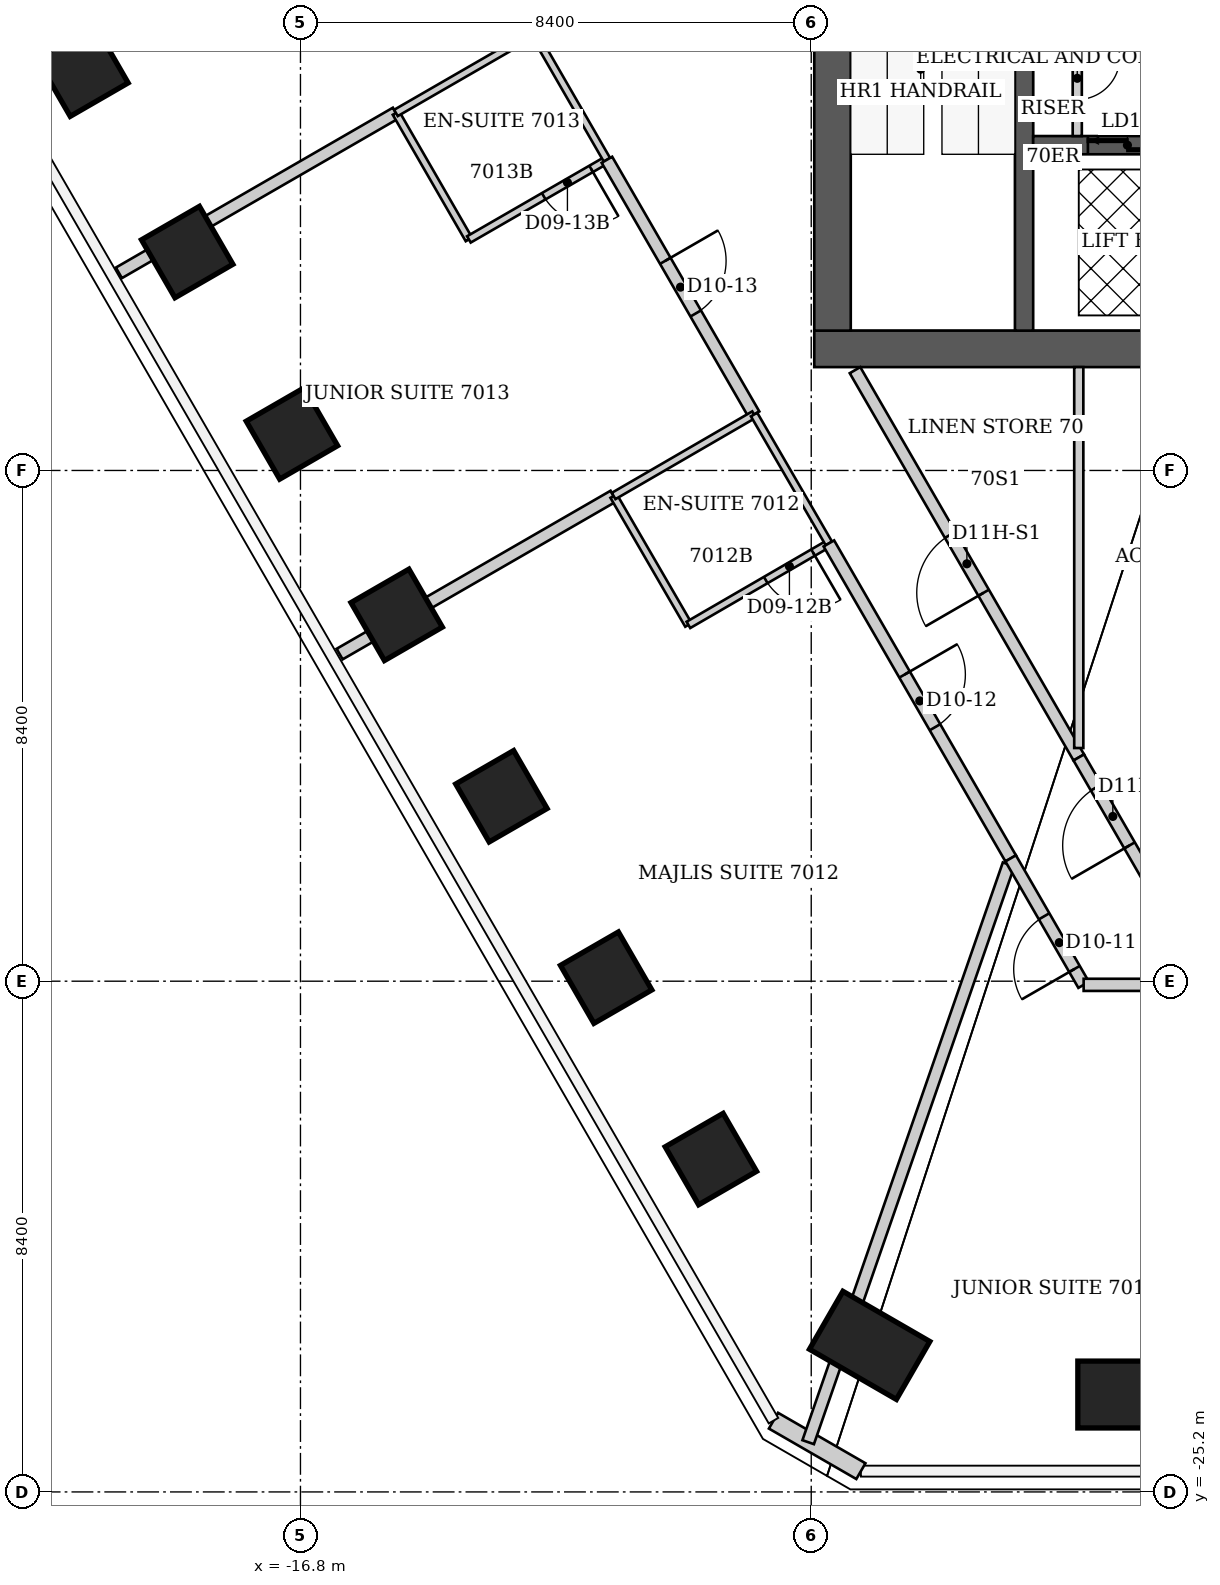
"""IFC4 building model, lengths in metres.
Left out: names, types, materials, properties, quantities, classifications, styles, units other than length and angle.
Written with IfcOpenShell. Run it as: python <this file> out.ifc"""

import sys

from ifc_helpers import new_model, si_unit, direction, frame, frame_2d, origin, origin_2d, place, context, subcontext, project, spatial, rectangle, extrude, element, fill, save


model = new_model("IFC4")
c1 = context("Model", 3, precision=1e-05, world=origin(), true_north=direction((0.0, 1.0)))
c2 = subcontext(c1, "Body", "Model", "MODEL_VIEW")
j1 = project(units=[si_unit("LENGTHUNIT", "METRE"), si_unit("PLANEANGLEUNIT", "RADIAN")], contexts=[c1])
p1 = place(None, origin())
s1 = spatial("IfcSite", under=j1, at=p1, CompositionType="ELEMENT")
p2 = place(p1, origin())
s2 = spatial("IfcBuilding", under=s1, at=p2, CompositionType="ELEMENT")
p3 = place(p2, frame((0.0, 0.0, 279.8)))
s3 = spatial("IfcBuildingStorey", under=s2, at=p3, CompositionType="ELEMENT", Elevation=279.8)
p4 = place(p3, frame((-3.466, -23.598, 0.0), z_axis=(0.0, 0.0, 1.0), x_axis=(0.0, -1.0, 0.0)))
e1 = element("IfcColumn", 1, at=p4, inside=s3, PredefinedType="COLUMN", context=c2, shape_type="SweptSolid", body=[
    extrude(rectangle(XDim=1.1, YDim=1.1, at=origin_2d()), origin(), (0.0, 0.0, 1.0), 3.8),
])
p5 = place(p3, frame((-7.439, -22.79, 0.0), z_axis=(0.0, 0.0, 1.0), x_axis=(-0.5, -0.866025403784, 0.0)))
e2 = element("IfcColumn", 2, at=p5, inside=s3, PredefinedType="COLUMN", context=c2, shape_type="SweptSolid", body=[
    extrude(rectangle(XDim=1.1, YDim=1.65, at=origin_2d()), origin(), (0.0, 0.0, 1.0), 3.8),
])
for number, where, z_axis, x_axis in (
    (3, (-10.05, -19.725, 0.0), (0.0, 0.0, 1.0), (-0.866, -0.5, 0.0)),
    (4, (-11.773, -16.742, 0.0), (0.0, 0.0, 1.0), (-0.866, -0.5, 0.0)),
    (5, (-13.495, -13.759, 0.0), (0.0, 0.0, 1.0), (-0.866, -0.5, 0.0)),
    (6, (-15.218, -10.775, 0.0), (0.0, 0.0, 1.0), (-0.866, -0.5, 0.0)),
    (7, (-16.94, -7.792, 0.0), (0.0, 0.0, 1.0), (-0.866, -0.5, 0.0)),
    (8, (-18.663, -4.808, 0.0), (0.0, 0.0, 1.0), (-0.866, -0.5, 0.0)),
    (9, (-20.385, -1.824, 0.0), (0.0, 0.0, 1.0), (-0.866, -0.5, 0.0)),
):
    element("IfcColumn", number, at=place(p3, frame(where, z_axis=z_axis, x_axis=x_axis)), inside=s3, PredefinedType="COLUMN", context=c2, shape_type="SweptSolid", body=[
        extrude(rectangle(XDim=1.1, YDim=1.1, at=origin_2d()), origin(), (0.0, 0.0, 1.0), 3.8),
    ])
p6 = place(p3, frame((-8.35, -6.4, 0.0), z_axis=(0.0, 0.0, 1.0), x_axis=(1.0, 0.0, 0.0)))
e10 = element("IfcWall", 10, at=p6, inside=s3, PredefinedType="SHEAR", context=c2, shape_type="SweptSolid", body=[
    extrude(rectangle(XDim=16.7, YDim=0.6, at=frame_2d((8.35, 0.0))), origin(), (0.0, 0.0, 1.0), 3.8),
])
p7 = place(p3, frame((-8.05, -6.1, 0.0), z_axis=(0.0, 0.0, 1.0), x_axis=(0.0, 1.0, 0.0)))
e11 = element("IfcWall", 11, at=p7, inside=s3, PredefinedType="SHEAR", context=c2, shape_type="SweptSolid", body=[
    extrude(rectangle(XDim=12.2, YDim=0.6, at=frame_2d((6.1, 0.0))), origin(), (0.0, 0.0, 1.0), 3.8),
])
p8 = place(p7, frame((7.6, 0.0, 0.0)))
e12 = element("IfcOpeningElement", 12, at=p8, cuts=e11, PredefinedType="OPENING", context=c2, shape_type="SweptSolid", body=[
    extrude(rectangle(XDim=1.2, YDim=2.2, at=frame_2d((0.6, 1.1))), frame((0.0, 0.3, 0.0), z_axis=(0.0, -1.0, 0.0), x_axis=(1.0, 0.0, 0.0)), (0.0, 0.0, 1.0), 0.6),
])
p9 = place(p3, frame((-4.9, -6.1, 0.0), z_axis=(0.0, 0.0, 1.0), x_axis=(0.0, 1.0, 0.0)))
e13 = element("IfcWall", 13, at=p9, inside=s3, PredefinedType="SHEAR", context=c2, shape_type="SweptSolid", body=[
    extrude(rectangle(XDim=7.2, YDim=0.3, at=frame_2d((3.6, 0.0))), origin(), (0.0, 0.0, 1.0), 3.8),
])
p10 = place(p3, frame((-4.75, -3.05, 0.0), z_axis=(0.0, 0.0, 1.0), x_axis=(1.0, 0.0, 0.0)))
e14 = element("IfcWall", 14, at=p10, inside=s3, PredefinedType="SHEAR", context=c2, shape_type="SweptSolid", body=[
    extrude(rectangle(XDim=3.1, YDim=0.3, at=frame_2d((1.55, 0.0))), origin(), (0.0, 0.0, 1.0), 3.8),
])
p11 = place(p10, frame((0.9, 0.0, 0.0)))
e15 = element("IfcOpeningElement", 15, at=p11, cuts=e14, PredefinedType="OPENING", context=c2, shape_type="SweptSolid", body=[
    extrude(rectangle(XDim=1.3, YDim=2.1, at=frame_2d((0.65, 1.05))), frame((0.0, 0.15, 0.0), z_axis=(0.0, -1.0, 0.0), x_axis=(1.0, 0.0, 0.0)), (0.0, 0.0, 1.0), 0.3),
])
p12 = place(p3, frame((-7.583, -24.858, 0.0), z_axis=(0.0, 0.0, 1.0), x_axis=(-0.865989634427, 0.500061949227, 0.0)))
e16 = element("IfcWall", 16, at=p12, inside=s3, PredefinedType="SOLIDWALL", context=c2, shape_type="SweptSolid", body=[
    extrude(rectangle(XDim=1.66, YDim=0.3, at=frame_2d((0.83, 0.0))), origin(), (0.0, 0.0, 1.0), 3.64),
])
p13 = place(p3, frame((-19.786, -5.15, 0.0), z_axis=(0.0, 0.0, 1.0), x_axis=(0.866075853571, 0.499912608224, 0.0)))
e17 = element("IfcWall", 17, at=p13, inside=s3, PredefinedType="PARTITIONING", context=c2, shape_type="SweptSolid", body=[
    extrude(rectangle(XDim=5.261, YDim=0.2, at=frame_2d((2.63, 0.0))), origin(), (0.0, 0.0, 1.0), 3.64),
])
p14 = place(p3, frame((-16.156, -11.42, 0.0), z_axis=(0.0, 0.0, 1.0), x_axis=(0.866170741273, 0.499748183552, 0.0)))
e18 = element("IfcWall", 18, at=p14, inside=s3, PredefinedType="PARTITIONING", context=c2, shape_type="SweptSolid", body=[
    extrude(rectangle(XDim=5.202, YDim=0.2, at=frame_2d((2.601, 0.0))), origin(), (0.0, 0.0, 1.0), 3.64),
])
p15 = place(p3, frame((-15.23, -2.52, 0.0), z_axis=(0.0, 0.0, 1.0), x_axis=(0.499737123639, -0.866177122335, 0.0)))
e19 = element("IfcWall", 19, at=p15, inside=s3, PredefinedType="PARTITIONING", context=c2, shape_type="SweptSolid", body=[
    extrude(rectangle(XDim=2.401, YDim=0.12, at=frame_2d((1.201, 0.0))), origin(), (0.0, 0.0, 1.0), 3.64),
])
p16 = place(p3, frame((-15.23, -2.52, 0.0), z_axis=(0.0, 0.0, 1.0), x_axis=(0.866114241029, 0.499846097802, 0.0)))
e20 = element("IfcWall", 20, at=p16, inside=s3, PredefinedType="PARTITIONING", context=c2, shape_type="SweptSolid", body=[
    extrude(rectangle(XDim=2.621, YDim=0.12, at=frame_2d((1.311, 0.0))), origin(), (0.0, 0.0, 1.0), 3.64),
])
p17 = place(p3, frame((-14.03, -4.6, 0.0), z_axis=(0.0, 0.0, 1.0), x_axis=(0.866114241029, 0.499846097802, 0.0)))
e21 = element("IfcWall", 21, at=p17, inside=s3, PredefinedType="PARTITIONING", context=c2, shape_type="SweptSolid", body=[
    extrude(rectangle(XDim=2.621, YDim=0.12, at=frame_2d((1.311, 0.0))), origin(), (0.0, 0.0, 1.0), 3.64),
])
p18 = place(p17, frame((1.421, 0.0, 0.0)))
e22 = element("IfcOpeningElement", 22, at=p18, cuts=e21, PredefinedType="OPENING", context=c2, shape_type="SweptSolid", body=[
    extrude(rectangle(XDim=0.9, YDim=2.03, at=frame_2d((0.45, 1.015))), frame((0.0, 0.06, 0.0), z_axis=(0.0, -1.0, 0.0), x_axis=(1.0, 0.0, 0.0)), (0.0, 0.0, 1.0), 0.12),
])
p19 = place(p3, frame((-12.96, -1.21, 0.0), z_axis=(0.0, 0.0, 1.0), x_axis=(0.499693115345, -0.866202511239, 0.0)))
e23 = element("IfcWall", 23, at=p19, inside=s3, PredefinedType="PARTITIONING", context=c2, shape_type="SweptSolid", body=[
    extrude(rectangle(XDim=2.401, YDim=0.12, at=frame_2d((1.201, 0.0))), origin(), (0.0, 0.0, 1.0), 3.64),
])
p20 = place(p3, frame((-11.76, -3.29, 0.0), z_axis=(0.0, 0.0, 1.0), x_axis=(0.500133000121, -0.86594860251, 0.0)))
e24 = element("IfcWall", 24, at=p20, inside=s3, PredefinedType="PARTITIONING", context=c2, shape_type="SweptSolid", body=[
    extrude(rectangle(XDim=4.839, YDim=0.2, at=frame_2d((2.419, 0.0))), origin(), (0.0, 0.0, 1.0), 3.64),
])
p21 = place(p20, frame((1.919, 0.0, 0.0)))
e25 = element("IfcOpeningElement", 25, at=p21, cuts=e24, PredefinedType="OPENING", context=c2, shape_type="SweptSolid", body=[
    extrude(rectangle(XDim=1.0, YDim=2.13, at=frame_2d((0.5, 1.065))), frame((0.0, 0.1, 0.0), z_axis=(0.0, -1.0, 0.0), x_axis=(1.0, 0.0, 0.0)), (0.0, 0.0, 1.0), 0.2),
])
p22 = place(p3, frame((-11.65, -8.82, 0.0), z_axis=(0.0, 0.0, 1.0), x_axis=(0.501856726365, -0.86495076519, 0.0)))
e26 = element("IfcWall", 26, at=p22, inside=s3, PredefinedType="PARTITIONING", context=c2, shape_type="SweptSolid", body=[
    extrude(rectangle(XDim=2.451, YDim=0.12, at=frame_2d((1.226, 0.0))), origin(), (0.0, 0.0, 1.0), 3.64),
])
p23 = place(p3, frame((-11.65, -8.82, 0.0), z_axis=(0.0, 0.0, 1.0), x_axis=(0.864966903181, 0.501828911485, 0.0)))
e27 = element("IfcWall", 27, at=p23, inside=s3, PredefinedType="PARTITIONING", context=c2, shape_type="SweptSolid", body=[
    extrude(rectangle(XDim=2.67, YDim=0.12, at=frame_2d((1.335, 0.0))), origin(), (0.0, 0.0, 1.0), 3.038),
])
p24 = place(p3, frame((-10.42, -10.94, 0.0), z_axis=(0.0, 0.0, 1.0), x_axis=(0.865006586495, 0.501760505939, 0.0)))
e28 = element("IfcWall", 28, at=p24, inside=s3, PredefinedType="PARTITIONING", context=c2, shape_type="SweptSolid", body=[
    extrude(rectangle(XDim=2.67, YDim=0.12, at=frame_2d((1.335, 0.0))), origin(), (0.0, 0.0, 1.0), 3.64),
])
p25 = place(p24, frame((1.47, 0.0, 0.0)))
e29 = element("IfcOpeningElement", 29, at=p25, cuts=e28, PredefinedType="OPENING", context=c2, shape_type="SweptSolid", body=[
    extrude(rectangle(XDim=0.9, YDim=2.03, at=frame_2d((0.45, 1.015))), frame((0.0, 0.06, 0.0), z_axis=(0.0, -1.0, 0.0), x_axis=(1.0, 0.0, 0.0)), (0.0, 0.0, 1.0), 0.12),
])
p26 = place(p3, frame((-9.34, -7.48, 0.0), z_axis=(0.0, 0.0, 1.0), x_axis=(0.501813488763, -0.864975850817, 0.0)))
e30 = element("IfcWall", 30, at=p26, inside=s3, PredefinedType="PARTITIONING", context=c2, shape_type="SweptSolid", body=[
    extrude(rectangle(XDim=2.451, YDim=0.12, at=frame_2d((1.226, 0.0))), origin(), (0.0, 0.0, 1.0), 3.64),
])
p27 = place(p3, frame((-8.45, -24.382, 0.0), z_axis=(0.0, 0.0, 1.0), x_axis=(0.327695764917, 0.944783300898, 0.0)))
e31 = element("IfcWall", 31, at=p27, inside=s3, PredefinedType="PARTITIONING", context=c2, shape_type="SweptSolid", body=[
    extrude(rectangle(XDim=10.058, YDim=0.2, at=frame_2d((5.029, 0.0))), origin(), (0.0, 0.0, 1.0), 3.64),
])
p28 = place(p3, frame((-8.11, -9.6, 0.0), z_axis=(0.0, 0.0, 1.0), x_axis=(0.49991915452, -0.866072074913, 0.0)))
e32 = element("IfcWall", 32, at=p28, inside=s3, PredefinedType="PARTITIONING", context=c2, shape_type="SweptSolid", body=[
    extrude(rectangle(XDim=5.981, YDim=0.2, at=frame_2d((2.99, 0.0))), origin(), (0.0, 0.0, 1.0), 3.64),
])
p29 = place(p28, frame((2.49, 0.0, 0.0)))
e33 = element("IfcOpeningElement", 33, at=p29, cuts=e32, PredefinedType="OPENING", context=c2, shape_type="SweptSolid", body=[
    extrude(rectangle(XDim=1.0, YDim=2.13, at=frame_2d((0.5, 1.065))), frame((0.0, 0.1, 0.0), z_axis=(0.0, -1.0, 0.0), x_axis=(1.0, 0.0, 0.0)), (0.0, 0.0, 1.0), 0.2),
])
p30 = place(p3, frame((-5.12, -14.78, 0.0), z_axis=(0.0, 0.0, 1.0), x_axis=(0.499813401482, -0.866133109688, 0.0)))
e34 = element("IfcWall", 34, at=p30, inside=s3, PredefinedType="PARTITIONING", context=c2, shape_type="SweptSolid", body=[
    extrude(rectangle(XDim=2.401, YDim=0.2, at=frame_2d((1.201, 0.0))), origin(), (0.0, 0.0, 1.0), 3.64),
])
p31 = place(p30, frame((1.1, 0.0, 0.0)))
e35 = element("IfcOpeningElement", 35, at=p31, cuts=e34, PredefinedType="OPENING", context=c2, shape_type="SweptSolid", body=[
    extrude(rectangle(XDim=1.0, YDim=2.13, at=frame_2d((0.5, 1.065))), frame((0.0, 0.1, 0.0), z_axis=(0.0, -1.0, 0.0), x_axis=(1.0, 0.0, 0.0)), (0.0, 0.0, 1.0), 0.2),
])
p32 = place(p3, frame((-4.0, -13.12, 0.0), z_axis=(0.0, 0.0, 1.0), x_axis=(-0.500218436225, 0.865899252835, 0.0)))
e36 = element("IfcWall", 36, at=p32, inside=s3, PredefinedType="PARTITIONING", context=c2, shape_type="SweptSolid", body=[
    extrude(rectangle(XDim=7.357, YDim=0.2, at=frame_2d((3.678, 0.0))), origin(), (0.0, 0.0, 1.0), 3.64),
])
p33 = place(p32, frame((3.128, 0.0, 0.0)))
e37 = element("IfcOpeningElement", 37, at=p33, cuts=e36, PredefinedType="OPENING", context=c2, shape_type="SweptSolid", body=[
    extrude(rectangle(XDim=1.1, YDim=2.2, at=frame_2d((0.55, 1.1))), frame((0.0, 0.1, 0.0), z_axis=(0.0, -1.0, 0.0), x_axis=(1.0, 0.0, 0.0)), (0.0, 0.0, 1.0), 0.2),
])
p34 = place(p3, frame((-4.0, -6.7, 0.0), z_axis=(0.0, 0.0, 1.0), x_axis=(0.0, -1.0, 0.0)))
e38 = element("IfcWall", 38, at=p34, inside=s3, PredefinedType="PARTITIONING", context=c2, shape_type="SweptSolid", body=[
    extrude(rectangle(XDim=6.265, YDim=0.15, at=frame_2d((3.133, 0.0))), origin(), (0.0, 0.0, 1.0), 3.64),
])
p35 = place(p3, frame((-3.92, -16.86, 0.0), z_axis=(0.0, 0.0, 1.0), x_axis=(1.0, 0.0, 0.0)))
e39 = element("IfcWall", 39, at=p35, inside=s3, PredefinedType="PARTITIONING", context=c2, shape_type="SweptSolid", body=[
    extrude(rectangle(XDim=3.92, YDim=0.2, at=frame_2d((1.96, 0.0))), origin(), (0.0, 0.0, 1.0), 3.64),
])
p36 = place(p3, frame((-2.88, -15.06, 0.0), z_axis=(0.0, 0.0, 1.0), x_axis=(-0.499983441833, 0.866034963436, 0.0)))
e40 = element("IfcWall", 40, at=p36, inside=s3, PredefinedType="PARTITIONING", context=c2, shape_type="SweptSolid", body=[
    extrude(rectangle(XDim=2.24, YDim=0.2, at=frame_2d((1.12, 0.0))), origin(), (0.0, 0.0, 1.0), 3.64),
])
p37 = place(p36, frame((0.57, 0.0, 0.0)))
e41 = element("IfcOpeningElement", 41, at=p37, cuts=e40, PredefinedType="OPENING", context=c2, shape_type="SweptSolid", body=[
    extrude(rectangle(XDim=1.1, YDim=2.2, at=frame_2d((0.55, 1.1))), frame((0.0, 0.1, 0.0), z_axis=(0.0, -1.0, 0.0), x_axis=(1.0, 0.0, 0.0)), (0.0, 0.0, 1.0), 0.2),
])
p38 = place(p3, frame((-4.025, -2.9, 0.0), z_axis=(0.0, 0.0, 1.0), x_axis=(0.0, 1.0, 0.0)))
e42 = element("IfcWall", 42, at=p38, inside=s3, PredefinedType="PARTITIONING", context=c2, shape_type="SweptSolid", body=[
    extrude(rectangle(XDim=1.775, YDim=0.15, at=frame_2d((0.887, 0.0))), origin(), (0.0, 0.0, 1.0), 3.64),
])
p39 = place(p38, frame((0.6, 0.0, 0.0)))
e43 = element("IfcOpeningElement", 43, at=p39, cuts=e42, PredefinedType="OPENING", context=c2, shape_type="SweptSolid", body=[
    extrude(rectangle(XDim=0.7, YDim=2.1, at=frame_2d((0.35, 1.05))), frame((0.0, 0.075, 0.0), z_axis=(0.0, -1.0, 0.0), x_axis=(1.0, 0.0, 0.0)), (0.0, 0.0, 1.0), 0.15),
])
p40 = place(p31, origin())
e44 = element("IfcDoor", 44, at=p40, inside=s3, OperationType="SINGLE_SWING_RIGHT", PredefinedType="DOOR", context=c2, shape_type="SweptSolid", body=[
    extrude(rectangle(XDim=1.0, YDim=2.13, at=frame_2d((0.5, 1.065))), frame((0.0, 0.025, 0.0), z_axis=(0.0, -1.0, 0.0), x_axis=(1.0, 0.0, 0.0)), (0.0, 0.0, 1.0), 0.05),
])
fill(e35, e44)
p41 = place(p29, origin())
e45 = element("IfcDoor", 45, at=p41, inside=s3, OperationType="SINGLE_SWING_LEFT", PredefinedType="DOOR", context=c2, shape_type="SweptSolid", body=[
    extrude(rectangle(XDim=1.0, YDim=2.13, at=frame_2d((0.5, 1.065))), frame((0.0, 0.025, 0.0), z_axis=(0.0, -1.0, 0.0), x_axis=(1.0, 0.0, 0.0)), (0.0, 0.0, 1.0), 0.05),
])
fill(e33, e45)
p42 = place(p25, origin())
e46 = element("IfcDoor", 46, at=p42, inside=s3, OperationType="SINGLE_SWING_RIGHT", PredefinedType="DOOR", context=c2, shape_type="SweptSolid", body=[
    extrude(rectangle(XDim=0.9, YDim=2.03, at=frame_2d((0.45, 1.015))), frame((0.0, 0.025, 0.0), z_axis=(0.0, -1.0, 0.0), x_axis=(1.0, 0.0, 0.0)), (0.0, 0.0, 1.0), 0.05),
])
fill(e29, e46)
p43 = place(p21, origin())
e47 = element("IfcDoor", 47, at=p43, inside=s3, OperationType="SINGLE_SWING_LEFT", PredefinedType="DOOR", context=c2, shape_type="SweptSolid", body=[
    extrude(rectangle(XDim=1.0, YDim=2.13, at=frame_2d((0.5, 1.065))), frame((0.0, 0.025, 0.0), z_axis=(0.0, -1.0, 0.0), x_axis=(1.0, 0.0, 0.0)), (0.0, 0.0, 1.0), 0.05),
])
fill(e25, e47)
p44 = place(p18, origin())
e48 = element("IfcDoor", 48, at=p44, inside=s3, OperationType="SINGLE_SWING_RIGHT", PredefinedType="DOOR", context=c2, shape_type="SweptSolid", body=[
    extrude(rectangle(XDim=0.9, YDim=2.03, at=frame_2d((0.45, 1.015))), frame((0.0, 0.025, 0.0), z_axis=(0.0, -1.0, 0.0), x_axis=(1.0, 0.0, 0.0)), (0.0, 0.0, 1.0), 0.05),
])
fill(e22, e48)
p45 = place(p33, origin())
e49 = element("IfcDoor", 49, at=p45, inside=s3, OperationType="SINGLE_SWING_LEFT", PredefinedType="DOOR", context=c2, shape_type="SweptSolid", body=[
    extrude(rectangle(XDim=1.1, YDim=2.2, at=frame_2d((0.55, 1.1))), frame((0.0, 0.025, 0.0), z_axis=(0.0, -1.0, 0.0), x_axis=(1.0, 0.0, 0.0)), (0.0, 0.0, 1.0), 0.05),
])
fill(e37, e49)
p46 = place(p37, origin())
e50 = element("IfcDoor", 50, at=p46, inside=s3, OperationType="SINGLE_SWING_LEFT", PredefinedType="DOOR", context=c2, shape_type="SweptSolid", body=[
    extrude(rectangle(XDim=1.1, YDim=2.2, at=frame_2d((0.55, 1.1))), frame((0.0, 0.025, 0.0), z_axis=(0.0, -1.0, 0.0), x_axis=(1.0, 0.0, 0.0)), (0.0, 0.0, 1.0), 0.05),
])
fill(e41, e50)
p47 = place(p39, origin())
e51 = element("IfcDoor", 51, at=p47, inside=s3, OperationType="SINGLE_SWING_RIGHT", PredefinedType="DOOR", context=c2, shape_type="SweptSolid", body=[
    extrude(rectangle(XDim=0.7, YDim=2.1, at=frame_2d((0.35, 1.05))), frame((0.0, 0.025, 0.0), z_axis=(0.0, -1.0, 0.0), x_axis=(1.0, 0.0, 0.0)), (0.0, 0.0, 1.0), 0.05),
])
fill(e43, e51)
p48 = place(p11, origin())
e52 = element("IfcDoor", 52, at=p48, inside=s3, OperationType="DOUBLE_DOOR_SLIDING", PredefinedType="DOOR", context=c2, shape_type="SweptSolid", body=[
    extrude(rectangle(XDim=1.3, YDim=2.1, at=frame_2d((0.65, 1.05))), frame((0.0, 0.025, 0.0), z_axis=(0.0, -1.0, 0.0), x_axis=(1.0, 0.0, 0.0)), (0.0, 0.0, 1.0), 0.05),
])
fill(e15, e52)
save(model, sys.argv[1])
